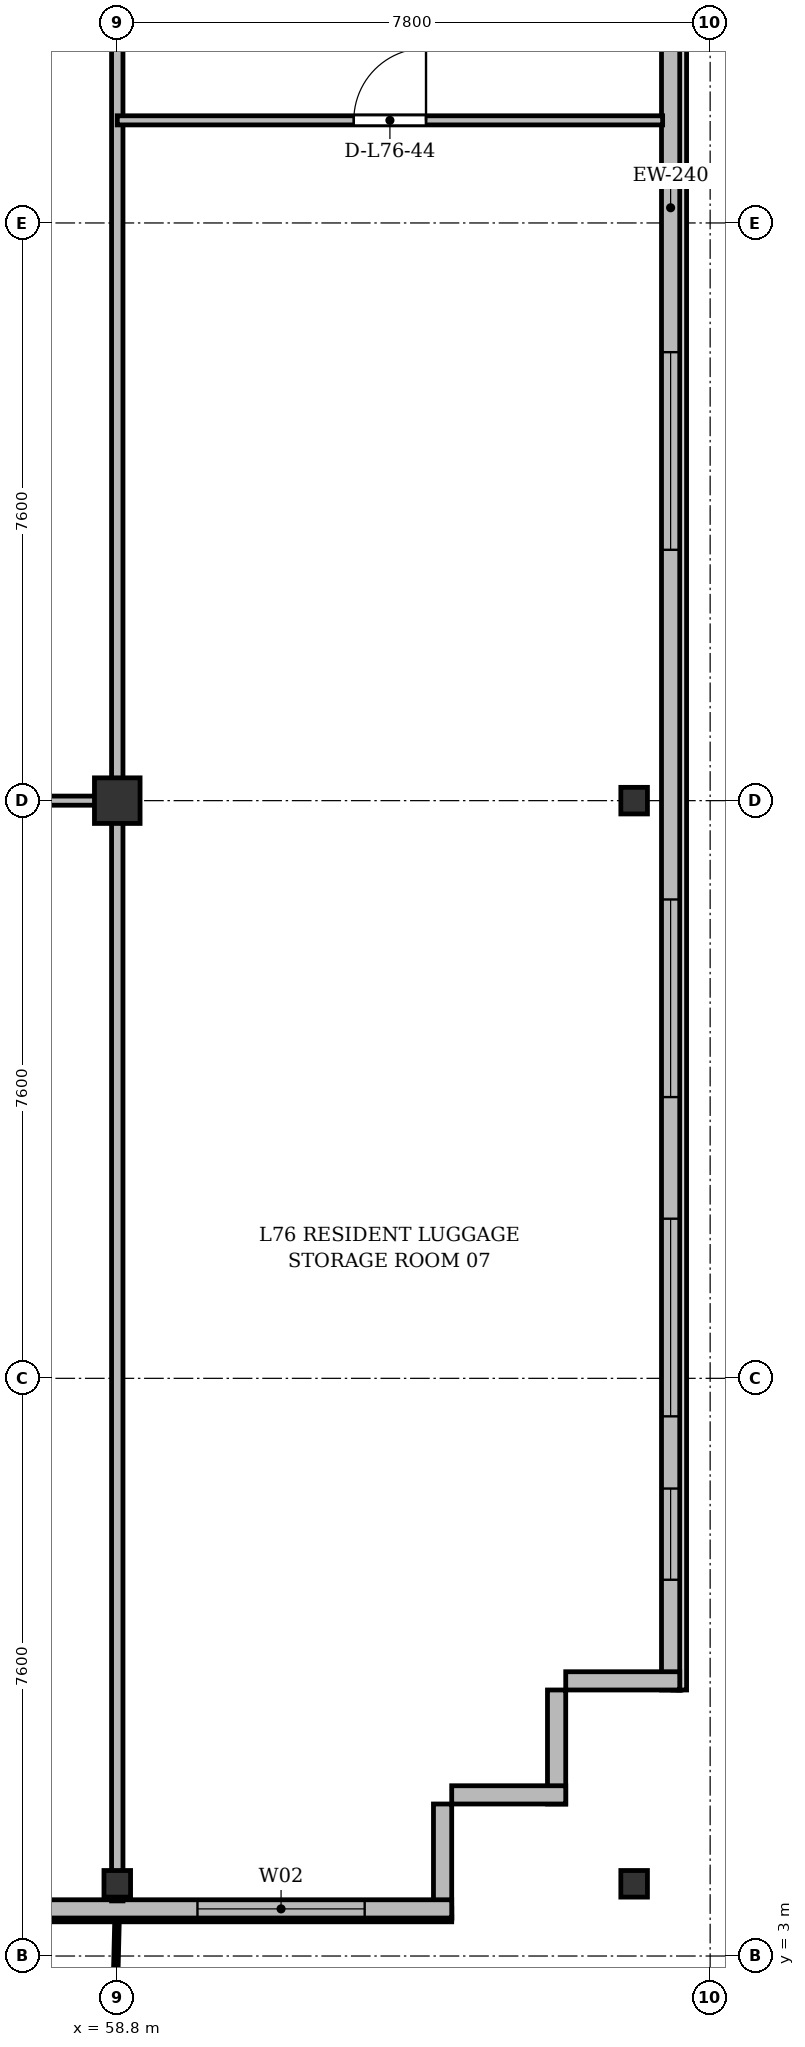
"""IFC4 building model, lengths in metres.
Left out: names, types, materials, properties, quantities, classifications, styles, units other than length and angle.
Written with IfcOpenShell. Run it as: python <this file> out.ifc"""

import sys

from ifc_helpers import new_model, si_unit, direction, frame, frame_2d, origin, origin_2d, place, context, subcontext, project, spatial, rectangle, i_section, extrude, source, transform, mapped, element, fill, save


model = new_model("IFC4")
c1 = context("Model", 3, precision=1e-05, world=origin(), true_north=direction((0.0, 1.0)))
c2 = subcontext(c1, "Body", "Model", "MODEL_VIEW")
j1 = project(units=[si_unit("LENGTHUNIT", "METRE"), si_unit("PLANEANGLEUNIT", "RADIAN")], contexts=[c1])
p1 = place(None, origin())
s1 = spatial("IfcSite", under=j1, at=p1, CompositionType="ELEMENT")
p2 = place(p1, origin())
s2 = spatial("IfcBuilding", under=s1, at=p2, CompositionType="ELEMENT")
p3 = place(p2, frame((0.0, 0.0, 291.9)))
s3 = spatial("IfcBuildingStorey", under=s2, at=p3, CompositionType="ELEMENT", Elevation=291.9)
m1 = source(origin(), c2, "Body", "SweptSolid", [
    extrude(i_section(OverallWidth=0.35, OverallDepth=0.35, WebThickness=0.018, FlangeThickness=0.028, at=origin_2d()), origin(), (0.0, 0.0, 1.0), 3.6),
])
p4 = place(p3, frame((58.8, 3.95, 0.0), z_axis=(0.0, 0.0, 1.0), x_axis=(1.0, 0.0, 0.0)))
e1 = element("IfcColumn", 1, at=p4, inside=s3, PredefinedType="COLUMN", context=c2, shape_type="MappedRepresentation", body=[
    mapped(m1, transform((0.0, 0.0, 0.0), x_axis=(1.0, 0.0, 0.0), y_axis=(0.0, 1.0, 0.0), z_axis=(0.0, 0.0, 1.0), scale=1.0)),
])
m2 = source(origin(), c2, "Body", "SweptSolid", [
    extrude(rectangle(XDim=0.6, YDim=0.6, at=origin_2d()), origin(), (0.0, 0.0, 1.0), 3.6),
])
p5 = place(p3, frame((58.8, 18.2, 0.0), z_axis=(0.0, 0.0, 1.0), x_axis=(1.0, 0.0, 0.0)))
e2 = element("IfcColumn", 2, at=p5, inside=s3, PredefinedType="COLUMN", context=c2, shape_type="MappedRepresentation", body=[
    mapped(m2, transform((0.0, 0.0, 0.0), x_axis=(1.0, 0.0, 0.0), y_axis=(0.0, 1.0, 0.0), z_axis=(0.0, 0.0, 1.0), scale=1.0)),
])
for number, where, z_axis, x_axis in (
    (3, (65.6, 3.95, 0.0), (0.0, 0.0, 1.0), (1.0, 0.0, 0.0)),
    (4, (65.6, 18.2, 0.0), (0.0, 0.0, 1.0), (1.0, 0.0, 0.0)),
):
    element("IfcColumn", number, at=place(p3, frame(where, z_axis=z_axis, x_axis=x_axis)), inside=s3, PredefinedType="COLUMN", context=c2, shape_type="MappedRepresentation", body=[
        mapped(m1, transform((0.0, 0.0, 0.0), x_axis=(1.0, 0.0, 0.0), y_axis=(0.0, 1.0, 0.0), z_axis=(0.0, 0.0, 1.0), scale=1.0)),
    ])
p6 = place(p3, frame((66.08, 45.5, 0.0), z_axis=(0.0, 0.0, 1.0), x_axis=(0.0, -1.0, 0.0)))
e5 = element("IfcWall", 5, at=p6, inside=s3, PredefinedType="SOLIDWALL", context=c2, shape_type="SweptSolid", body=[
    extrude(rectangle(XDim=39.0, YDim=0.24, at=frame_2d((19.5, 0.0))), origin(), (0.0, 0.0, 1.0), 3.18),
])
p7 = place(p6, frame((36.35, 0.0, 0.92)))
e6 = element("IfcOpeningElement", 6, at=p7, cuts=e5, PredefinedType="OPENING", context=c2, shape_type="SweptSolid", body=[
    extrude(rectangle(XDim=1.2, YDim=1.65, at=frame_2d((0.6, 0.825))), frame((0.0, 0.13, 0.0), z_axis=(0.0, -1.0, 0.0), x_axis=(1.0, 0.0, 0.0)), (0.0, 0.0, 1.0), 0.26),
])
p8 = place(p6, frame((32.8, 0.0, 0.92)))
e7 = element("IfcOpeningElement", 7, at=p8, cuts=e5, PredefinedType="OPENING", context=c2, shape_type="SweptSolid", body=[
    extrude(rectangle(XDim=2.6, YDim=1.9, at=frame_2d((1.3, 0.95))), frame((0.0, 0.13, 0.0), z_axis=(0.0, -1.0, 0.0), x_axis=(1.0, 0.0, 0.0)), (0.0, 0.0, 1.0), 0.26),
])
p9 = place(p6, frame((28.6, 0.0, 0.92)))
e8 = element("IfcOpeningElement", 8, at=p9, cuts=e5, PredefinedType="OPENING", context=c2, shape_type="SweptSolid", body=[
    extrude(rectangle(XDim=2.6, YDim=1.9, at=frame_2d((1.3, 0.95))), frame((0.0, 0.13, 0.0), z_axis=(0.0, -1.0, 0.0), x_axis=(1.0, 0.0, 0.0)), (0.0, 0.0, 1.0), 0.26),
])
p10 = place(p6, frame((21.4, 0.0, 0.92)))
e9 = element("IfcOpeningElement", 9, at=p10, cuts=e5, PredefinedType="OPENING", context=c2, shape_type="SweptSolid", body=[
    extrude(rectangle(XDim=2.6, YDim=1.9, at=frame_2d((1.3, 0.95))), frame((0.0, 0.13, 0.0), z_axis=(0.0, -1.0, 0.0), x_axis=(1.0, 0.0, 0.0)), (0.0, 0.0, 1.0), 0.26),
])
p11 = place(p6, frame((7.4, 0.0, 0.92)))
e10 = element("IfcOpeningElement", 10, at=p11, cuts=e5, PredefinedType="OPENING", context=c2, shape_type="SweptSolid", body=[
    extrude(rectangle(XDim=2.6, YDim=1.9, at=frame_2d((1.3, 0.95))), frame((0.0, 0.13, 0.0), z_axis=(0.0, -1.0, 0.0), x_axis=(1.0, 0.0, 0.0)), (0.0, 0.0, 1.0), 0.26),
])
p12 = place(p6, frame((4.5, 0.0, 0.92)))
e11 = element("IfcOpeningElement", 11, at=p12, cuts=e5, PredefinedType="OPENING", context=c2, shape_type="SweptSolid", body=[
    extrude(rectangle(XDim=1.2, YDim=1.65, at=frame_2d((0.6, 0.825))), frame((0.0, 0.13, 0.0), z_axis=(0.0, -1.0, 0.0), x_axis=(1.0, 0.0, 0.0)), (0.0, 0.0, 1.0), 0.26),
])
p13 = place(p6, frame((1.15, 0.0, 0.92)))
e12 = element("IfcOpeningElement", 12, at=p13, cuts=e5, PredefinedType="OPENING", context=c2, shape_type="SweptSolid", body=[
    extrude(rectangle(XDim=1.2, YDim=1.65, at=frame_2d((0.6, 0.825))), frame((0.0, 0.13, 0.0), z_axis=(0.0, -1.0, 0.0), x_axis=(1.0, 0.0, 0.0)), (0.0, 0.0, 1.0), 0.26),
])
p14 = place(p3, frame((66.2, 6.62, 0.0), z_axis=(0.0, 0.0, 1.0), x_axis=(-1.0, 0.0, 0.0)))
e13 = element("IfcWall", 13, at=p14, inside=s3, PredefinedType="SOLIDWALL", context=c2, shape_type="SweptSolid", body=[
    extrude(rectangle(XDim=1.5, YDim=0.24, at=frame_2d((0.75, 0.0))), origin(), (0.0, 0.0, 1.0), 2.68),
])
for number, where, z_axis, x_axis in (
    (14, (64.58, 6.5, 0.0), (0.0, 0.0, 1.0), (0.0, -1.0, 0.0)),
    (15, (64.7, 5.12, 0.0), (0.0, 0.0, 1.0), (-1.0, 0.0, 0.0)),
):
    element("IfcWall", number, at=place(p3, frame(where, z_axis=z_axis, x_axis=x_axis)), inside=s3, PredefinedType="SOLIDWALL", context=c2, shape_type="SweptSolid", body=[
        extrude(rectangle(XDim=1.5, YDim=0.24, at=frame_2d((0.75, 0.0))), origin(), (0.0, 0.0, 1.0), 3.18),
    ])
p15 = place(p3, frame((63.08, 5.0, 0.0), z_axis=(0.0, 0.0, 1.0), x_axis=(0.0, -1.0, 0.0)))
e16 = element("IfcWall", 16, at=p15, inside=s3, PredefinedType="SOLIDWALL", context=c2, shape_type="SweptSolid", body=[
    extrude(rectangle(XDim=1.5, YDim=0.24, at=frame_2d((0.75, 0.0))), origin(), (0.0, 0.0, 1.0), 2.73),
])
p16 = place(p3, frame((63.2, 3.62, 0.0), z_axis=(0.0, 0.0, 1.0), x_axis=(-1.0, 0.0, 0.0)))
e17 = element("IfcWall", 17, at=p16, inside=s3, PredefinedType="SOLIDWALL", context=c2, shape_type="SweptSolid", body=[
    extrude(rectangle(XDim=20.2, YDim=0.24, at=frame_2d((10.1, 0.0))), origin(), (0.0, 0.0, 1.0), 3.18),
])
p17 = place(p16, frame((1.145, 0.0, 0.9)))
e18 = element("IfcOpeningElement", 18, at=p17, cuts=e17, PredefinedType="OPENING", context=c2, shape_type="SweptSolid", body=[
    extrude(rectangle(XDim=2.2, YDim=1.8, at=frame_2d((1.1, 0.9))), frame((0.0, 0.13, 0.0), z_axis=(0.0, -1.0, 0.0), x_axis=(1.0, 0.0, 0.0)), (0.0, 0.0, 1.0), 0.26),
])
p18 = place(p16, frame((7.55, 0.0, 0.9)))
e19 = element("IfcOpeningElement", 19, at=p18, cuts=e17, PredefinedType="OPENING", context=c2, shape_type="SweptSolid", body=[
    extrude(rectangle(XDim=1.5, YDim=1.75, at=frame_2d((0.75, 0.875))), frame((0.0, 0.13, 0.0), z_axis=(0.0, -1.0, 0.0), x_axis=(1.0, 0.0, 0.0)), (0.0, 0.0, 1.0), 0.26),
])
p19 = place(p16, frame((13.864, 0.0, 0.0)))
e20 = element("IfcOpeningElement", 20, at=p19, cuts=e17, PredefinedType="OPENING", context=c2, shape_type="SweptSolid", body=[
    extrude(rectangle(XDim=1.2, YDim=2.2, at=frame_2d((0.6, 1.1))), frame((0.0, 0.13, 0.0), z_axis=(0.0, -1.0, 0.0), x_axis=(1.0, 0.0, 0.0)), (0.0, 0.0, 1.0), 0.26),
])
p20 = place(p16, frame((16.775, 0.0, 0.9)))
e21 = element("IfcOpeningElement", 21, at=p20, cuts=e17, PredefinedType="OPENING", context=c2, shape_type="SweptSolid", body=[
    extrude(rectangle(XDim=1.65, YDim=1.85, at=frame_2d((0.825, 0.925))), frame((0.0, 0.13, 0.0), z_axis=(0.0, -1.0, 0.0), x_axis=(1.0, 0.0, 0.0)), (0.0, 0.0, 1.0), 0.26),
])
p21 = place(p3, frame((58.8, 3.725, 0.0), z_axis=(0.0, 0.0, 1.0), x_axis=(0.0, 1.0, 0.0)))
e22 = element("IfcWall", 22, at=p21, inside=s3, PredefinedType="PARTITIONING", context=c2, shape_type="SweptSolid", body=[
    extrude(rectangle(XDim=27.275, YDim=0.15, at=frame_2d((13.637, 0.0))), origin(), (0.0, 0.0, 1.0), 2.53),
])
p22 = place(p3, frame((51.0, 18.2, 0.0), z_axis=(0.0, 0.0, 1.0), x_axis=(1.0, 0.0, 0.0)))
e23 = element("IfcWall", 23, at=p22, inside=s3, PredefinedType="PARTITIONING", context=c2, shape_type="SweptSolid", body=[
    extrude(rectangle(XDim=7.8, YDim=0.12, at=frame_2d((3.9, 0.0))), origin(), (0.0, 0.0, 1.0), 2.73),
])
p23 = place(p22, frame((3.333, 0.0, 0.0)))
e24 = element("IfcOpeningElement", 24, at=p23, cuts=e23, PredefinedType="OPENING", context=c2, shape_type="SweptSolid", body=[
    extrude(rectangle(XDim=0.95, YDim=2.15, at=frame_2d((0.475, 1.075))), frame((0.0, 0.07, 0.0), z_axis=(0.0, -1.0, 0.0), x_axis=(1.0, 0.0, 0.0)), (0.0, 0.0, 1.0), 0.14),
])
p24 = place(p3, frame((58.8, 27.15, 0.0), z_axis=(0.0, 0.0, 1.0), x_axis=(1.0, 0.0, 0.0)))
e25 = element("IfcWall", 25, at=p24, inside=s3, PredefinedType="PARTITIONING", context=c2, shape_type="SweptSolid", body=[
    extrude(rectangle(XDim=7.175, YDim=0.12, at=frame_2d((3.587, 0.0))), origin(), (0.0, 0.0, 1.0), 2.53),
])
p25 = place(p24, frame((3.112, 0.0, 0.0)))
e26 = element("IfcOpeningElement", 26, at=p25, cuts=e25, PredefinedType="OPENING", context=c2, shape_type="SweptSolid", body=[
    extrude(rectangle(XDim=0.95, YDim=2.15, at=frame_2d((0.475, 1.075))), frame((0.0, 0.07, 0.0), z_axis=(0.0, -1.0, 0.0), x_axis=(1.0, 0.0, 0.0)), (0.0, 0.0, 1.0), 0.14),
])
m3 = source(origin(), c2, "Body", "SweptSolid", [
    extrude(rectangle(XDim=1.2, YDim=1.65, at=frame_2d((0.6, 0.825))), frame((0.0, 0.03, 0.0), z_axis=(0.0, -1.0, 0.0), x_axis=(1.0, 0.0, 0.0)), (0.0, 0.0, 1.0), 0.06),
])
p26 = place(p7, origin())
e27 = element("IfcWindow", 27, at=p26, inside=s3, PartitioningType="SINGLE_PANEL", PredefinedType="WINDOW", context=c2, shape_type="MappedRepresentation", body=[
    mapped(m3, transform((0.0, 0.0, 0.0), x_axis=(1.0, 0.0, 0.0), y_axis=(0.0, 1.0, 0.0), z_axis=(0.0, 0.0, 1.0), scale=1.0)),
])
fill(e6, e27)
m4 = source(origin(), c2, "Body", "SweptSolid", [
    extrude(rectangle(XDim=2.6, YDim=1.9, at=frame_2d((1.3, 0.95))), frame((0.0, 0.03, 0.0), z_axis=(0.0, -1.0, 0.0), x_axis=(1.0, 0.0, 0.0)), (0.0, 0.0, 1.0), 0.06),
])
p27 = place(p8, origin())
e28 = element("IfcWindow", 28, at=p27, inside=s3, PartitioningType="SINGLE_PANEL", PredefinedType="WINDOW", context=c2, shape_type="MappedRepresentation", body=[
    mapped(m4, transform((0.0, 0.0, 0.0), x_axis=(1.0, 0.0, 0.0), y_axis=(0.0, 1.0, 0.0), z_axis=(0.0, 0.0, 1.0), scale=1.0)),
])
fill(e7, e28)
p28 = place(p9, origin())
e29 = element("IfcWindow", 29, at=p28, inside=s3, PartitioningType="SINGLE_PANEL", PredefinedType="WINDOW", context=c2, shape_type="MappedRepresentation", body=[
    mapped(m4, transform((0.0, 0.0, 0.0), x_axis=(1.0, 0.0, 0.0), y_axis=(0.0, 1.0, 0.0), z_axis=(0.0, 0.0, 1.0), scale=1.0)),
])
fill(e8, e29)
p29 = place(p10, origin())
e30 = element("IfcWindow", 30, at=p29, inside=s3, PartitioningType="SINGLE_PANEL", PredefinedType="WINDOW", context=c2, shape_type="MappedRepresentation", body=[
    mapped(m4, transform((0.0, 0.0, 0.0), x_axis=(1.0, 0.0, 0.0), y_axis=(0.0, 1.0, 0.0), z_axis=(0.0, 0.0, 1.0), scale=1.0)),
])
fill(e9, e30)
m5 = source(origin(), c2, "Body", "SweptSolid", [
    extrude(rectangle(XDim=2.2, YDim=1.8, at=frame_2d((1.1, 0.9))), frame((0.0, 0.03, 0.0), z_axis=(0.0, -1.0, 0.0), x_axis=(1.0, 0.0, 0.0)), (0.0, 0.0, 1.0), 0.06),
])
p30 = place(p17, origin())
e31 = element("IfcWindow", 31, at=p30, inside=s3, PartitioningType="SINGLE_PANEL", PredefinedType="WINDOW", context=c2, shape_type="MappedRepresentation", body=[
    mapped(m5, transform((0.0, 0.0, 0.0), x_axis=(1.0, 0.0, 0.0), y_axis=(0.0, 1.0, 0.0), z_axis=(0.0, 0.0, 1.0), scale=1.0)),
])
fill(e18, e31)
m6 = source(origin(), c2, "Body", "SweptSolid", [
    extrude(rectangle(XDim=0.95, YDim=2.15, at=frame_2d((0.475, 1.075))), frame((0.0, 0.025, 0.0), z_axis=(0.0, -1.0, 0.0), x_axis=(1.0, 0.0, 0.0)), (0.0, 0.0, 1.0), 0.05),
])
p31 = place(p25, origin())
e32 = element("IfcDoor", 32, at=p31, inside=s3, OperationType="SINGLE_SWING_RIGHT", PredefinedType="DOOR", context=c2, shape_type="MappedRepresentation", body=[
    mapped(m6, transform((0.0, 0.0, 0.0), x_axis=(1.0, 0.0, 0.0), y_axis=(0.0, 1.0, 0.0), z_axis=(0.0, 0.0, 1.0), scale=1.0)),
])
fill(e26, e32)
save(model, sys.argv[1])
